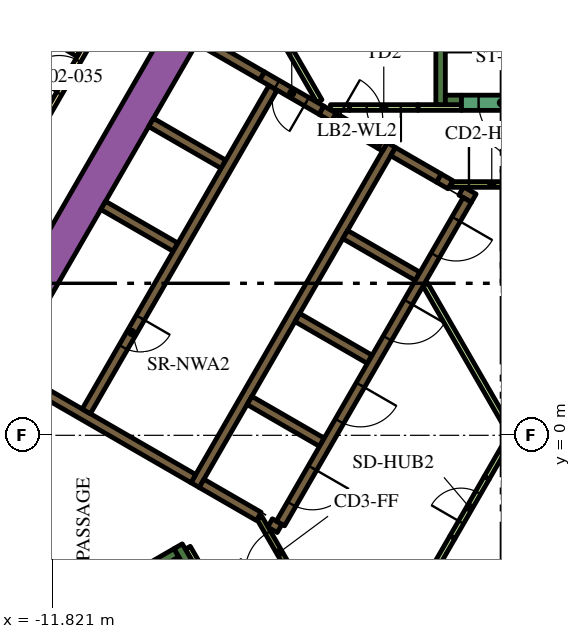
"""IFC4 building model, lengths in metres.
Left out: names, types, materials, properties, quantities, classifications, styles, units other than length and angle.
Written with IfcOpenShell. Run it as: python <this file> out.ifc"""

import sys

from ifc_helpers import new_model, si_unit, direction, frame, frame_2d, origin, place, context, subcontext, project, spatial, polyline, rectangle, outline, extrude, element, fill, save


model = new_model("IFC4")
c1 = context("Model", 3, precision=1e-05, world=origin(), true_north=direction((0.0, 1.0)))
c2 = subcontext(c1, "Body", "Model", "MODEL_VIEW")
j1 = project(units=[si_unit("LENGTHUNIT", "METRE"), si_unit("PLANEANGLEUNIT", "RADIAN")], contexts=[c1])
p1 = place(None, origin())
s1 = spatial("IfcSite", under=j1, at=p1, CompositionType="ELEMENT")
p2 = place(p1, origin())
s2 = spatial("IfcBuilding", under=s1, at=p2, CompositionType="ELEMENT")
p3 = place(p2, frame((0.0, 0.0, 43.2)))
s3 = spatial("IfcBuildingStorey", under=s2, at=p3, CompositionType="ELEMENT", Elevation=43.2)
p4 = place(p3, frame((-15.36, -1.503, 0.0), z_axis=(0.0, 0.0, 1.0), x_axis=(0.50000389221, 0.866023156604, 0.0)))
e1 = element("IfcWall", 1, at=p4, inside=s3, PredefinedType="SOLIDWALL", context=c2, shape_type="SweptSolid", body=[
    extrude(rectangle(XDim=21.0, YDim=0.9, at=frame_2d((10.5, 0.0))), origin(), (0.0, 0.0, 1.0), 3.9),
])
p5 = place(p3, frame((-1.6, 8.7, 0.0), z_axis=(0.0, 0.0, 1.0), x_axis=(0.0, 1.0, 0.0)))
e2 = element("IfcWall", 2, at=p5, inside=s3, PredefinedType="SOLIDWALL", context=c2, shape_type="SweptSolid", body=[
    extrude(rectangle(XDim=7.05, YDim=0.25, at=frame_2d((3.525, 0.0))), origin(), (0.0, 0.0, 1.0), 3.9),
])
p6 = place(p3, frame((-1.475, 8.825, 0.0), z_axis=(0.0, 0.0, 1.0), x_axis=(1.0, 0.0, 0.0)))
e3 = element("IfcWall", 3, at=p6, inside=s3, PredefinedType="SOLIDWALL", context=c2, shape_type="SweptSolid", body=[
    extrude(rectangle(XDim=0.425, YDim=0.25, at=frame_2d((0.212, 0.0))), origin(), (0.0, 0.0, 1.0), 3.9),
])
p7 = place(p3, frame((-14.44, -6.49, 0.0), z_axis=(0.0, 0.0, 1.0), x_axis=(0.866022966069, 0.500004222222, 0.0)))
e4 = element("IfcWall", 4, at=p7, inside=s3, PredefinedType="SOLIDWALL", context=c2, shape_type="SweptSolid", body=[
    extrude(rectangle(XDim=6.8, YDim=0.25, at=frame_2d((3.4, 0.0))), origin(), (0.0, 0.0, 1.0), 3.9),
])
p8 = place(p3, frame((-8.168, -3.503, 0.0), z_axis=(0.0, 0.0, 1.0), x_axis=(-0.499952099219, 0.866053057547, 0.0)))
e5 = element("IfcWall", 5, at=p8, inside=s3, PredefinedType="SOLIDWALL", context=c2, shape_type="SweptSolid", body=[
    extrude(rectangle(XDim=0.675, YDim=0.25, at=frame_2d((0.337, 0.0))), origin(), (0.0, 0.0, 1.0), 3.9),
])
p9 = place(p3, frame((-8.06, -1.311, 0.0), z_axis=(0.0, 0.0, 1.0), x_axis=(0.50000273126, 0.866023826885, 0.0)))
e6 = element("IfcWall", 6, at=p9, inside=s3, PredefinedType="SOLIDWALL", context=c2, shape_type="SweptSolid", body=[
    extrude(rectangle(XDim=10.33, YDim=0.25, at=frame_2d((5.165, 0.0))), origin(), (0.0, 0.0, 1.0), 3.9),
])
p10 = place(p3, frame((-1.342, 6.595, 0.0), z_axis=(0.0, 0.0, 1.0), x_axis=(-0.866046247233, 0.49996389635, 0.0)))
e7 = element("IfcWall", 7, at=p10, inside=s3, PredefinedType="SOLIDWALL", context=c2, shape_type="SweptSolid", body=[
    extrude(rectangle(XDim=0.35, YDim=0.25, at=frame_2d((0.175, 0.0))), origin(), (0.0, 0.0, 1.0), 3.9),
])
p11 = place(p3, frame((-1.647, 6.771, 0.0), z_axis=(0.0, 0.0, 1.0), x_axis=(-0.865971728693, 0.500092956464, 0.0)))
e8 = element("IfcWall", 8, at=p11, inside=s3, PredefinedType="SOLIDWALL", context=c2, shape_type="SweptSolid", body=[
    extrude(rectangle(XDim=1.388, YDim=0.25, at=frame_2d((0.694, 0.0))), origin(), (0.0, 0.0, 1.0), 3.9),
])
p12 = place(p3, frame((-0.728, 6.24, 0.0), z_axis=(0.0, 0.0, 1.0), x_axis=(-0.866088799389, 0.499890179513, 0.0)))
e9 = element("IfcWall", 9, at=p12, inside=s3, PredefinedType="SOLIDWALL", context=c2, shape_type="SweptSolid", body=[
    extrude(rectangle(XDim=0.378, YDim=0.25, at=frame_2d((0.189, 0.0))), origin(), (0.0, 0.0, 1.0), 3.9),
])
for number, where, z_axis, x_axis in (
    (10, (-2.204, 4.182, 0.0), (0.0, 0.0, 1.0), (-0.866, 0.5, 0.0)),
    (11, (-5.369, 3.1, 0.0), (0.0, 0.0, 1.0), (0.866, -0.5, 0.0)),
    (12, (-4.724, -0.182, 0.0), (0.0, 0.0, 1.0), (-0.866, 0.5, 0.0)),
):
    element("IfcWall", number, at=place(p3, frame(where, z_axis=z_axis, x_axis=x_axis)), inside=s3, PredefinedType="SOLIDWALL", context=c2, shape_type="SweptSolid", body=[
        extrude(rectangle(XDim=2.2, YDim=0.25, at=frame_2d((1.1, 0.0))), origin(), (0.0, 0.0, 1.0), 3.9),
    ])
p13 = place(p3, frame((-6.088, -2.305, 0.0), z_axis=(0.0, 0.0, 1.0), x_axis=(0.866059450854, -0.499941024108, 0.0)))
e13 = element("IfcWall", 13, at=p13, inside=s3, PredefinedType="SOLIDWALL", context=c2, shape_type="SweptSolid", body=[
    extrude(rectangle(XDim=0.29, YDim=0.25, at=frame_2d((0.145, 0.0))), origin(), (0.0, 0.0, 1.0), 3.9),
])
p14 = place(p3, frame((-7.889, -1.265, 0.0), z_axis=(0.0, 0.0, 1.0), x_axis=(0.865986741702, -0.500066958712, 0.0)))
e14 = element("IfcWall", 14, at=p14, inside=s3, PredefinedType="SOLIDWALL", context=c2, shape_type="SweptSolid", body=[
    extrude(rectangle(XDim=1.738, YDim=0.25, at=frame_2d((0.869, 0.0))), origin(), (0.0, 0.0, 1.0), 3.9),
])
p15 = place(p3, frame((-8.106, -1.14, 0.0), z_axis=(0.0, 0.0, 1.0), x_axis=(-0.866000643155, 0.500042884217, 0.0)))
e15 = element("IfcWall", 15, at=p15, inside=s3, PredefinedType="SOLIDWALL", context=c2, shape_type="SweptSolid", body=[
    extrude(rectangle(XDim=5.65, YDim=0.25, at=frame_2d((2.825, 0.0))), origin(), (0.0, 0.0, 1.0), 3.9),
])
p16 = place(p3, origin())
e16 = element("IfcWall", 16, at=p16, inside=s3, PredefinedType="SOLIDWALL", context=c2, shape_type="SweptSolid", body=[
    extrude(outline(polyline([(-3.128, 7.481), (-3.259, 7.557), (-3.134, 7.773), (-3.003, 7.698), (-3.128, 7.481)])), origin(), (0.0, 0.0, 1.0), 3.9),
])
for number, where, z_axis, x_axis in (
    (17, (-8.574, 4.95, 0.0), (0.0, 0.0, 1.0), (-0.866, 0.5, 0.0)),
    (18, (-7.314, 7.132, 0.0), (0.0, 0.0, 1.0), (-0.866, 0.5, 0.0)),
):
    element("IfcWall", number, at=place(p3, frame(where, z_axis=z_axis, x_axis=x_axis)), inside=s3, PredefinedType="SOLIDWALL", context=c2, shape_type="SweptSolid", body=[
        extrude(rectangle(XDim=2.2, YDim=0.25, at=frame_2d((1.1, 0.0))), origin(), (0.0, 0.0, 1.0), 3.9),
    ])
p17 = place(p3, frame((-6.296, 9.455, 0.0), z_axis=(0.0, 0.0, 1.0), x_axis=(-0.866011930837, 0.500023335103, 0.0)))
e19 = element("IfcWall", 19, at=p17, inside=s3, PredefinedType="SOLIDWALL", context=c2, shape_type="SweptSolid", body=[
    extrude(rectangle(XDim=1.92, YDim=0.25, at=frame_2d((0.96, 0.0))), origin(), (0.0, 0.0, 1.0), 3.9),
])
p18 = place(p3, frame((-4.409, 8.365, 0.0), z_axis=(0.0, 0.0, 1.0), x_axis=(-0.866057014183, 0.499945245186, 0.0)))
e20 = element("IfcWall", 20, at=p18, inside=s3, PredefinedType="SOLIDWALL", context=c2, shape_type="SweptSolid", body=[
    extrude(rectangle(XDim=0.379, YDim=0.25, at=frame_2d((0.19, 0.0))), origin(), (0.0, 0.0, 1.0), 3.9),
])
p19 = place(p3, frame((-1.887, -3.718, 0.0), z_axis=(0.0, 0.0, 1.0), x_axis=(0.500057179532, 0.865992388649, 0.0)))
e21 = element("IfcWall", 21, at=p19, inside=s3, PredefinedType="PARTITIONING", context=c2, shape_type="SweptSolid", body=[
    extrude(rectangle(XDim=1.199, YDim=0.15, at=frame_2d((0.6, 0.0))), origin(), (0.0, 0.0, 1.0), 2.75),
])
p20 = place(p3, frame((-8.252, -2.958, 0.0), z_axis=(0.0, 0.0, 1.0), x_axis=(0.500174715838, -0.865924508047, 0.0)))
e22 = element("IfcWall", 22, at=p20, inside=s3, PredefinedType="PARTITIONING", context=c2, shape_type="SweptSolid", body=[
    extrude(rectangle(XDim=0.514, YDim=0.15, at=frame_2d((0.257, 0.0))), origin(), (0.0, 0.0, 1.0), 2.75),
])
p21 = place(p3, frame((-2.195, 8.625, 0.0), z_axis=(0.0, 0.0, 1.0), x_axis=(1.0, 0.0, 0.0)))
e23 = element("IfcWall", 23, at=p21, inside=s3, PredefinedType="PARTITIONING", context=c2, shape_type="SweptSolid", body=[
    extrude(rectangle(XDim=1.145, YDim=0.15, at=frame_2d((0.573, 0.0))), origin(), (0.0, 0.0, 1.0), 2.75),
])
p22 = place(p3, frame((-6.823, 12.318, 0.0), z_axis=(0.0, 0.0, 1.0), x_axis=(0.500007885066, -0.866020851292, 0.0)))
e24 = element("IfcWall", 24, at=p22, inside=s3, PredefinedType="PARTITIONING", context=c2, shape_type="SweptSolid", body=[
    extrude(rectangle(XDim=4.072, YDim=0.15, at=frame_2d((2.036, 0.0))), origin(), (0.0, 0.0, 1.0), 2.75),
])
p23 = place(p3, frame((-4.498, 8.625, 0.0), z_axis=(0.0, 0.0, 1.0), x_axis=(1.0, 0.0, 0.0)))
e25 = element("IfcWall", 25, at=p23, inside=s3, PredefinedType="PARTITIONING", context=c2, shape_type="SweptSolid", body=[
    extrude(rectangle(XDim=0.502, YDim=0.15, at=frame_2d((0.251, 0.0))), origin(), (0.0, 0.0, 1.0), 2.75),
])
p24 = place(p3, frame((2.435, -3.718, 0.0), z_axis=(0.0, 0.0, 1.0), x_axis=(-0.499985176046, 0.866033962229, 0.0)))
e26 = element("IfcWall", 26, at=p24, inside=s3, PredefinedType="PARTITIONING", context=c2, shape_type="SweptSolid", body=[
    extrude(rectangle(XDim=8.875, YDim=0.15, at=frame_2d((4.438, 0.0))), origin(), (0.0, 0.0, 1.0), 2.75),
])
p25 = place(p3, frame((-0.387, -1.121, 0.0), z_axis=(0.0, 0.0, 1.0), x_axis=(0.500057179532, 0.865992388649, 0.0)))
e27 = element("IfcWall", 27, at=p25, inside=s3, PredefinedType="PARTITIONING", context=c2, shape_type="SweptSolid", body=[
    extrude(rectangle(XDim=1.199, YDim=0.15, at=frame_2d((0.6, 0.0))), origin(), (0.0, 0.0, 1.0), 2.75),
])
p26 = place(p3, frame((-6.008, 9.144, 0.0), z_axis=(0.0, 0.0, 1.0), x_axis=(-0.500006956611, -0.866021387346, 0.0)))
e28 = element("IfcWall", 28, at=p26, inside=s3, PredefinedType="SOLIDWALL", context=c2, shape_type="SweptSolid", body=[
    extrude(rectangle(XDim=9.83, YDim=0.25, at=frame_2d((4.915, 0.0))), origin(), (0.0, 0.0, 1.0), 3.9),
])
p27 = place(p26, frame((6.985, 0.0, 0.0)))
e29 = element("IfcOpeningElement", 29, at=p27, cuts=e28, PredefinedType="OPENING", context=c2, shape_type="SweptSolid", body=[
    extrude(rectangle(XDim=0.9, YDim=2.1, at=frame_2d((0.45, 1.05))), frame((0.0, 0.135, 0.0), z_axis=(0.0, -1.0, 0.0), x_axis=(1.0, 0.0, 0.0)), (0.0, 0.0, 1.0), 0.27),
])
p28 = place(p3, frame((-0.898, 6.194, 0.0), z_axis=(0.0, 0.0, 1.0), x_axis=(-0.499996202215, -0.866027596426, 0.0)))
e30 = element("IfcWall", 30, at=p28, inside=s3, PredefinedType="SOLIDWALL", context=c2, shape_type="SweptSolid", body=[
    extrude(rectangle(XDim=9.83, YDim=0.25, at=frame_2d((4.915, 0.0))), origin(), (0.0, 0.0, 1.0), 3.9),
])
p29 = place(p28, frame((0.585, 0.0, 0.0)))
e31 = element("IfcOpeningElement", 31, at=p29, cuts=e30, PredefinedType="OPENING", context=c2, shape_type="SweptSolid", body=[
    extrude(rectangle(XDim=1.1, YDim=2.1, at=frame_2d((0.55, 1.05))), frame((0.0, 0.135, 0.0), z_axis=(0.0, -1.0, 0.0), x_axis=(1.0, 0.0, 0.0)), (0.0, 0.0, 1.0), 0.27),
])
p30 = place(p28, frame((3.105, 0.0, 0.0)))
e32 = element("IfcOpeningElement", 32, at=p30, cuts=e30, PredefinedType="OPENING", context=c2, shape_type="SweptSolid", body=[
    extrude(rectangle(XDim=1.1, YDim=2.1, at=frame_2d((0.55, 1.05))), frame((0.0, 0.135, 0.0), z_axis=(0.0, -1.0, 0.0), x_axis=(1.0, 0.0, 0.0)), (0.0, 0.0, 1.0), 0.27),
])
p31 = place(p28, frame((5.625, 0.0, 0.0)))
e33 = element("IfcOpeningElement", 33, at=p31, cuts=e30, PredefinedType="OPENING", context=c2, shape_type="SweptSolid", body=[
    extrude(rectangle(XDim=1.1, YDim=2.1, at=frame_2d((0.55, 1.05))), frame((0.0, 0.135, 0.0), z_axis=(0.0, -1.0, 0.0), x_axis=(1.0, 0.0, 0.0)), (0.0, 0.0, 1.0), 0.27),
])
p32 = place(p28, frame((8.145, 0.0, 0.0)))
e34 = element("IfcOpeningElement", 34, at=p32, cuts=e30, PredefinedType="OPENING", context=c2, shape_type="SweptSolid", body=[
    extrude(rectangle(XDim=1.1, YDim=2.1, at=frame_2d((0.55, 1.05))), frame((0.0, 0.135, 0.0), z_axis=(0.0, -1.0, 0.0), x_axis=(1.0, 0.0, 0.0)), (0.0, 0.0, 1.0), 0.27),
])
p33 = place(p3, frame((1.05, 8.75, 0.0), z_axis=(0.0, 0.0, 1.0), x_axis=(-1.0, 0.0, 0.0)))
e35 = element("IfcWall", 35, at=p33, inside=s3, PredefinedType="SOLIDWALL", context=c2, shape_type="SweptSolid", body=[
    extrude(rectangle(XDim=2.1, YDim=0.4, at=frame_2d((1.05, 0.0))), origin(), (0.0, 0.0, 1.0), 3.9),
])
p34 = place(p33, frame((0.45, 0.0, 0.0)))
e36 = element("IfcOpeningElement", 36, at=p34, cuts=e35, PredefinedType="OPENING", context=c2, shape_type="SweptSolid", body=[
    extrude(rectangle(XDim=1.2, YDim=2.1, at=frame_2d((0.6, 1.05))), frame((0.0, 0.21, 0.0), z_axis=(0.0, -1.0, 0.0), x_axis=(1.0, 0.0, 0.0)), (0.0, 0.0, 1.0), 0.42),
])
p35 = place(p3, frame((-2.195, 8.625, 0.0), z_axis=(0.0, 0.0, 1.0), x_axis=(-1.0, 0.0, 0.0)))
e37 = element("IfcWall", 37, at=p35, inside=s3, PredefinedType="PARTITIONING", context=c2, shape_type="SweptSolid", body=[
    extrude(rectangle(XDim=1.8, YDim=0.15, at=frame_2d((0.9, 0.0))), origin(), (0.0, 0.0, 1.0), 2.75),
])
p36 = place(p35, frame((0.45, 0.0, 0.0)))
e38 = element("IfcOpeningElement", 38, at=p36, cuts=e37, PredefinedType="OPENING", context=c2, shape_type="SweptSolid", body=[
    extrude(rectangle(XDim=0.9, YDim=2.1, at=frame_2d((0.45, 1.05))), frame((0.0, 0.085, 0.0), z_axis=(0.0, -1.0, 0.0), x_axis=(1.0, 0.0, 0.0)), (0.0, 0.0, 1.0), 0.17),
])
p37 = place(p3, frame((-1.303, 6.6, 0.0), z_axis=(0.0, 0.0, 1.0), x_axis=(1.0, 0.0, 0.0)))
e39 = element("IfcWall", 39, at=p37, inside=s3, PredefinedType="PARTITIONING", context=c2, shape_type="SweptSolid", body=[
    extrude(rectangle(XDim=2.1, YDim=0.15, at=frame_2d((1.05, 0.0))), origin(), (0.0, 0.0, 1.0), 3.9),
])
p38 = place(p37, frame((0.45, 0.0, 0.0)))
e40 = element("IfcOpeningElement", 40, at=p38, cuts=e39, PredefinedType="OPENING", context=c2, shape_type="SweptSolid", body=[
    extrude(rectangle(XDim=1.2, YDim=2.1, at=frame_2d((0.6, 1.05))), frame((0.0, 0.085, 0.0), z_axis=(0.0, -1.0, 0.0), x_axis=(1.0, 0.0, 0.0)), (0.0, 0.0, 1.0), 0.17),
])
p39 = place(p3, frame((-5.317, -3.99, 0.0), z_axis=(0.0, 0.0, 1.0), x_axis=(-0.500027713859, 0.866009402589, 0.0)))
e41 = element("IfcWall", 41, at=p39, inside=s3, PredefinedType="PARTITIONING", context=c2, shape_type="SweptSolid", body=[
    extrude(rectangle(XDim=2.1, YDim=0.15, at=frame_2d((1.05, 0.0))), origin(), (0.0, 0.0, 1.0), 3.9),
])
p40 = place(p39, frame((0.45, 0.0, 0.0)))
e42 = element("IfcOpeningElement", 42, at=p40, cuts=e41, PredefinedType="OPENING", context=c2, shape_type="SweptSolid", body=[
    extrude(rectangle(XDim=1.2, YDim=2.1, at=frame_2d((0.6, 1.05))), frame((0.0, 0.085, 0.0), z_axis=(0.0, -1.0, 0.0), x_axis=(1.0, 0.0, 0.0)), (0.0, 0.0, 1.0), 0.17),
])
p41 = place(p3, frame((-4.409, 8.365, 0.0), z_axis=(0.0, 0.0, 1.0), x_axis=(0.866034573852, -0.49998411664, 0.0)))
e43 = element("IfcWall", 43, at=p41, inside=s3, PredefinedType="SOLIDWALL", context=c2, shape_type="SweptSolid", body=[
    extrude(rectangle(XDim=1.4, YDim=0.25, at=frame_2d((0.7, 0.0))), origin(), (0.0, 0.0, 1.0), 3.9),
])
p42 = place(p41, frame((0.1, 0.0, 0.0)))
e44 = element("IfcOpeningElement", 44, at=p42, cuts=e43, PredefinedType="OPENING", context=c2, shape_type="SweptSolid", body=[
    extrude(rectangle(XDim=1.2, YDim=2.1, at=frame_2d((0.6, 1.05))), frame((0.0, 0.135, 0.0), z_axis=(0.0, -1.0, 0.0), x_axis=(1.0, 0.0, 0.0)), (0.0, 0.0, 1.0), 0.27),
])
p43 = place(p3, frame((-1.287, -2.679, 0.0), z_axis=(0.0, 0.0, 1.0), x_axis=(0.499961193289, 0.866047807691, 0.0)))
e45 = element("IfcWall", 45, at=p43, inside=s3, PredefinedType="PARTITIONING", context=c2, shape_type="SweptSolid", body=[
    extrude(rectangle(XDim=1.8, YDim=0.15, at=frame_2d((0.9, 0.0))), origin(), (0.0, 0.0, 1.0), 2.75),
])
p44 = place(p43, frame((0.45, 0.0, 0.0)))
e46 = element("IfcOpeningElement", 46, at=p44, cuts=e45, PredefinedType="OPENING", context=c2, shape_type="SweptSolid", body=[
    extrude(rectangle(XDim=0.9, YDim=2.1, at=frame_2d((0.45, 1.05))), frame((0.0, 0.085, 0.0), z_axis=(0.0, -1.0, 0.0), x_axis=(1.0, 0.0, 0.0)), (0.0, 0.0, 1.0), 0.17),
])
p45 = place(p3, frame((-4.737, 8.555, 0.0), z_axis=(0.0, 0.0, 1.0), x_axis=(-0.865989075817, 0.500062916607, 0.0)))
e47 = element("IfcWall", 47, at=p45, inside=s3, PredefinedType="SOLIDWALL", context=c2, shape_type="SweptSolid", body=[
    extrude(rectangle(XDim=1.8, YDim=0.25, at=frame_2d((0.9, 0.0))), origin(), (0.0, 0.0, 1.0), 3.9),
])
p46 = place(p45, frame((0.45, 0.0, 0.0)))
e48 = element("IfcOpeningElement", 48, at=p46, cuts=e47, PredefinedType="OPENING", context=c2, shape_type="SweptSolid", body=[
    extrude(rectangle(XDim=0.9, YDim=2.1, at=frame_2d((0.45, 1.05))), frame((0.0, 0.135, 0.0), z_axis=(0.0, -1.0, 0.0), x_axis=(1.0, 0.0, 0.0)), (0.0, 0.0, 1.0), 0.27),
])
p47 = place(p3, frame((-19.081, -3.9, 0.0), z_axis=(0.0, 0.0, 1.0), x_axis=(0.499998313975, 0.866026377209, 0.0)))
e49 = element("IfcWall", 49, at=p47, inside=s3, PredefinedType="PARTITIONING", context=c2, shape_type="SweptSolid", body=[
    extrude(rectangle(XDim=25.766, YDim=0.15, at=frame_2d((12.883, 0.0))), origin(), (0.0, 0.0, 1.0), 2.75),
])
p48 = place(p47, frame((16.196, 0.0, 0.0)))
e50 = element("IfcOpeningElement", 50, at=p48, cuts=e49, PredefinedType="OPENING", context=c2, shape_type="SweptSolid", body=[
    extrude(rectangle(XDim=1.0, YDim=2.1, at=frame_2d((0.5, 1.05))), frame((0.0, 0.085, 0.0), z_axis=(0.0, -1.0, 0.0), x_axis=(1.0, 0.0, 0.0)), (0.0, 0.0, 1.0), 0.17),
])
p49 = place(p47, frame((14.889, 0.0, 0.0)))
e51 = element("IfcOpeningElement", 51, at=p49, cuts=e49, PredefinedType="OPENING", context=c2, shape_type="SweptSolid", body=[
    extrude(rectangle(XDim=1.0, YDim=2.1, at=frame_2d((0.5, 1.05))), frame((0.0, 0.085, 0.0), z_axis=(0.0, -1.0, 0.0), x_axis=(1.0, 0.0, 0.0)), (0.0, 0.0, 1.0), 0.17),
])
p50 = place(p47, frame((3.698, 0.0, 0.0)))
e52 = element("IfcOpeningElement", 52, at=p50, cuts=e49, PredefinedType="OPENING", context=c2, shape_type="SweptSolid", body=[
    extrude(rectangle(XDim=1.1, YDim=2.1, at=frame_2d((0.55, 1.05))), frame((0.0, 0.085, 0.0), z_axis=(0.0, -1.0, 0.0), x_axis=(1.0, 0.0, 0.0)), (0.0, 0.0, 1.0), 0.17),
])
p51 = place(p47, frame((2.392, 0.0, 0.0)))
e53 = element("IfcOpeningElement", 53, at=p51, cuts=e49, PredefinedType="OPENING", context=c2, shape_type="SweptSolid", body=[
    extrude(rectangle(XDim=1.0, YDim=2.1, at=frame_2d((0.5, 1.05))), frame((0.0, 0.085, 0.0), z_axis=(0.0, -1.0, 0.0), x_axis=(1.0, 0.0, 0.0)), (0.0, 0.0, 1.0), 0.17),
])
p52 = place(p3, frame((-17.856, 13.999, 0.0), z_axis=(0.0, 0.0, 1.0), x_axis=(0.861371519381, -0.507975497047, 0.0)))
e54 = element("IfcWall", 54, at=p52, inside=s3, PredefinedType="PARTITIONING", context=c2, shape_type="SweptSolid", body=[
    extrude(rectangle(XDim=7.804, YDim=0.15, at=frame_2d((3.902, 0.0))), origin(), (0.0, 0.0, 1.0), 2.75),
])
p53 = place(p27, origin())
e55 = element("IfcDoor", 55, at=p53, inside=s3, OperationType="SINGLE_SWING_LEFT", PredefinedType="DOOR", context=c2, shape_type="SweptSolid", body=[
    extrude(rectangle(XDim=0.9, YDim=2.1, at=frame_2d((0.45, 1.05))), frame((0.0, 0.025, 0.0), z_axis=(0.0, -1.0, 0.0), x_axis=(1.0, 0.0, 0.0)), (0.0, 0.0, 1.0), 0.05),
])
fill(e29, e55)
p54 = place(p29, origin())
e56 = element("IfcDoor", 56, at=p54, inside=s3, OperationType="DOUBLE_DOOR_SLIDING", PredefinedType="DOOR", context=c2, shape_type="SweptSolid", body=[
    extrude(rectangle(XDim=1.1, YDim=2.1, at=frame_2d((0.55, 1.05))), frame((0.0, 0.025, 0.0), z_axis=(0.0, -1.0, 0.0), x_axis=(1.0, 0.0, 0.0)), (0.0, 0.0, 1.0), 0.05),
])
fill(e31, e56)
p55 = place(p30, origin())
e57 = element("IfcDoor", 57, at=p55, inside=s3, OperationType="DOUBLE_DOOR_SLIDING", PredefinedType="DOOR", context=c2, shape_type="SweptSolid", body=[
    extrude(rectangle(XDim=1.1, YDim=2.1, at=frame_2d((0.55, 1.05))), frame((0.0, 0.025, 0.0), z_axis=(0.0, -1.0, 0.0), x_axis=(1.0, 0.0, 0.0)), (0.0, 0.0, 1.0), 0.05),
])
fill(e32, e57)
p56 = place(p31, origin())
e58 = element("IfcDoor", 58, at=p56, inside=s3, OperationType="DOUBLE_DOOR_SLIDING", PredefinedType="DOOR", context=c2, shape_type="SweptSolid", body=[
    extrude(rectangle(XDim=1.1, YDim=2.1, at=frame_2d((0.55, 1.05))), frame((0.0, 0.025, 0.0), z_axis=(0.0, -1.0, 0.0), x_axis=(1.0, 0.0, 0.0)), (0.0, 0.0, 1.0), 0.05),
])
fill(e33, e58)
p57 = place(p32, origin())
e59 = element("IfcDoor", 59, at=p57, inside=s3, OperationType="DOUBLE_DOOR_SLIDING", PredefinedType="DOOR", context=c2, shape_type="SweptSolid", body=[
    extrude(rectangle(XDim=1.1, YDim=2.1, at=frame_2d((0.55, 1.05))), frame((0.0, 0.025, 0.0), z_axis=(0.0, -1.0, 0.0), x_axis=(1.0, 0.0, 0.0)), (0.0, 0.0, 1.0), 0.05),
])
fill(e34, e59)
p58 = place(p34, origin())
e60 = element("IfcDoor", 60, at=p58, inside=s3, OperationType="SINGLE_SWING_LEFT", PredefinedType="DOOR", context=c2, shape_type="SweptSolid", body=[
    extrude(rectangle(XDim=1.2, YDim=2.1, at=frame_2d((0.6, 1.05))), frame((0.0, 0.025, 0.0), z_axis=(0.0, -1.0, 0.0), x_axis=(1.0, 0.0, 0.0)), (0.0, 0.0, 1.0), 0.05),
])
fill(e36, e60)
p59 = place(p36, origin())
e61 = element("IfcDoor", 61, at=p59, inside=s3, OperationType="SINGLE_SWING_LEFT", PredefinedType="DOOR", context=c2, shape_type="SweptSolid", body=[
    extrude(rectangle(XDim=0.9, YDim=2.1, at=frame_2d((0.45, 1.05))), frame((0.0, 0.025, 0.0), z_axis=(0.0, -1.0, 0.0), x_axis=(1.0, 0.0, 0.0)), (0.0, 0.0, 1.0), 0.05),
])
fill(e38, e61)
p60 = place(p38, origin())
e62 = element("IfcDoor", 62, at=p60, inside=s3, OperationType="SINGLE_SWING_LEFT", PredefinedType="DOOR", context=c2, shape_type="SweptSolid", body=[
    extrude(rectangle(XDim=1.2, YDim=2.1, at=frame_2d((0.6, 1.05))), frame((0.0, 0.025, 0.0), z_axis=(0.0, -1.0, 0.0), x_axis=(1.0, 0.0, 0.0)), (0.0, 0.0, 1.0), 0.05),
])
fill(e40, e62)
p61 = place(p40, origin())
e63 = element("IfcDoor", 63, at=p61, inside=s3, OperationType="SINGLE_SWING_LEFT", PredefinedType="DOOR", context=c2, shape_type="SweptSolid", body=[
    extrude(rectangle(XDim=1.2, YDim=2.1, at=frame_2d((0.6, 1.05))), frame((0.0, 0.025, 0.0), z_axis=(0.0, -1.0, 0.0), x_axis=(1.0, 0.0, 0.0)), (0.0, 0.0, 1.0), 0.05),
])
fill(e42, e63)
p62 = place(p42, origin())
e64 = element("IfcDoor", 64, at=p62, inside=s3, OperationType="SINGLE_SWING_LEFT", PredefinedType="DOOR", context=c2, shape_type="SweptSolid", body=[
    extrude(rectangle(XDim=1.2, YDim=2.1, at=frame_2d((0.6, 1.05))), frame((0.0, 0.025, 0.0), z_axis=(0.0, -1.0, 0.0), x_axis=(1.0, 0.0, 0.0)), (0.0, 0.0, 1.0), 0.05),
])
fill(e44, e64)
p63 = place(p44, origin())
e65 = element("IfcDoor", 65, at=p63, inside=s3, OperationType="SINGLE_SWING_LEFT", PredefinedType="DOOR", context=c2, shape_type="SweptSolid", body=[
    extrude(rectangle(XDim=0.9, YDim=2.1, at=frame_2d((0.45, 1.05))), frame((0.0, 0.025, 0.0), z_axis=(0.0, -1.0, 0.0), x_axis=(1.0, 0.0, 0.0)), (0.0, 0.0, 1.0), 0.05),
])
fill(e46, e65)
p64 = place(p46, origin())
e66 = element("IfcDoor", 66, at=p64, inside=s3, OperationType="SINGLE_SWING_LEFT", PredefinedType="DOOR", context=c2, shape_type="SweptSolid", body=[
    extrude(rectangle(XDim=0.9, YDim=2.1, at=frame_2d((0.45, 1.05))), frame((0.0, 0.025, 0.0), z_axis=(0.0, -1.0, 0.0), x_axis=(1.0, 0.0, 0.0)), (0.0, 0.0, 1.0), 0.05),
])
fill(e48, e66)
p65 = place(p49, origin())
e67 = element("IfcDoor", 67, at=p65, inside=s3, OperationType="SINGLE_SWING_RIGHT", PredefinedType="DOOR", context=c2, shape_type="SweptSolid", body=[
    extrude(rectangle(XDim=1.0, YDim=2.1, at=frame_2d((0.5, 1.05))), frame((0.0, 0.025, 0.0), z_axis=(0.0, -1.0, 0.0), x_axis=(1.0, 0.0, 0.0)), (0.0, 0.0, 1.0), 0.05),
])
fill(e51, e67)
save(model, sys.argv[1])
